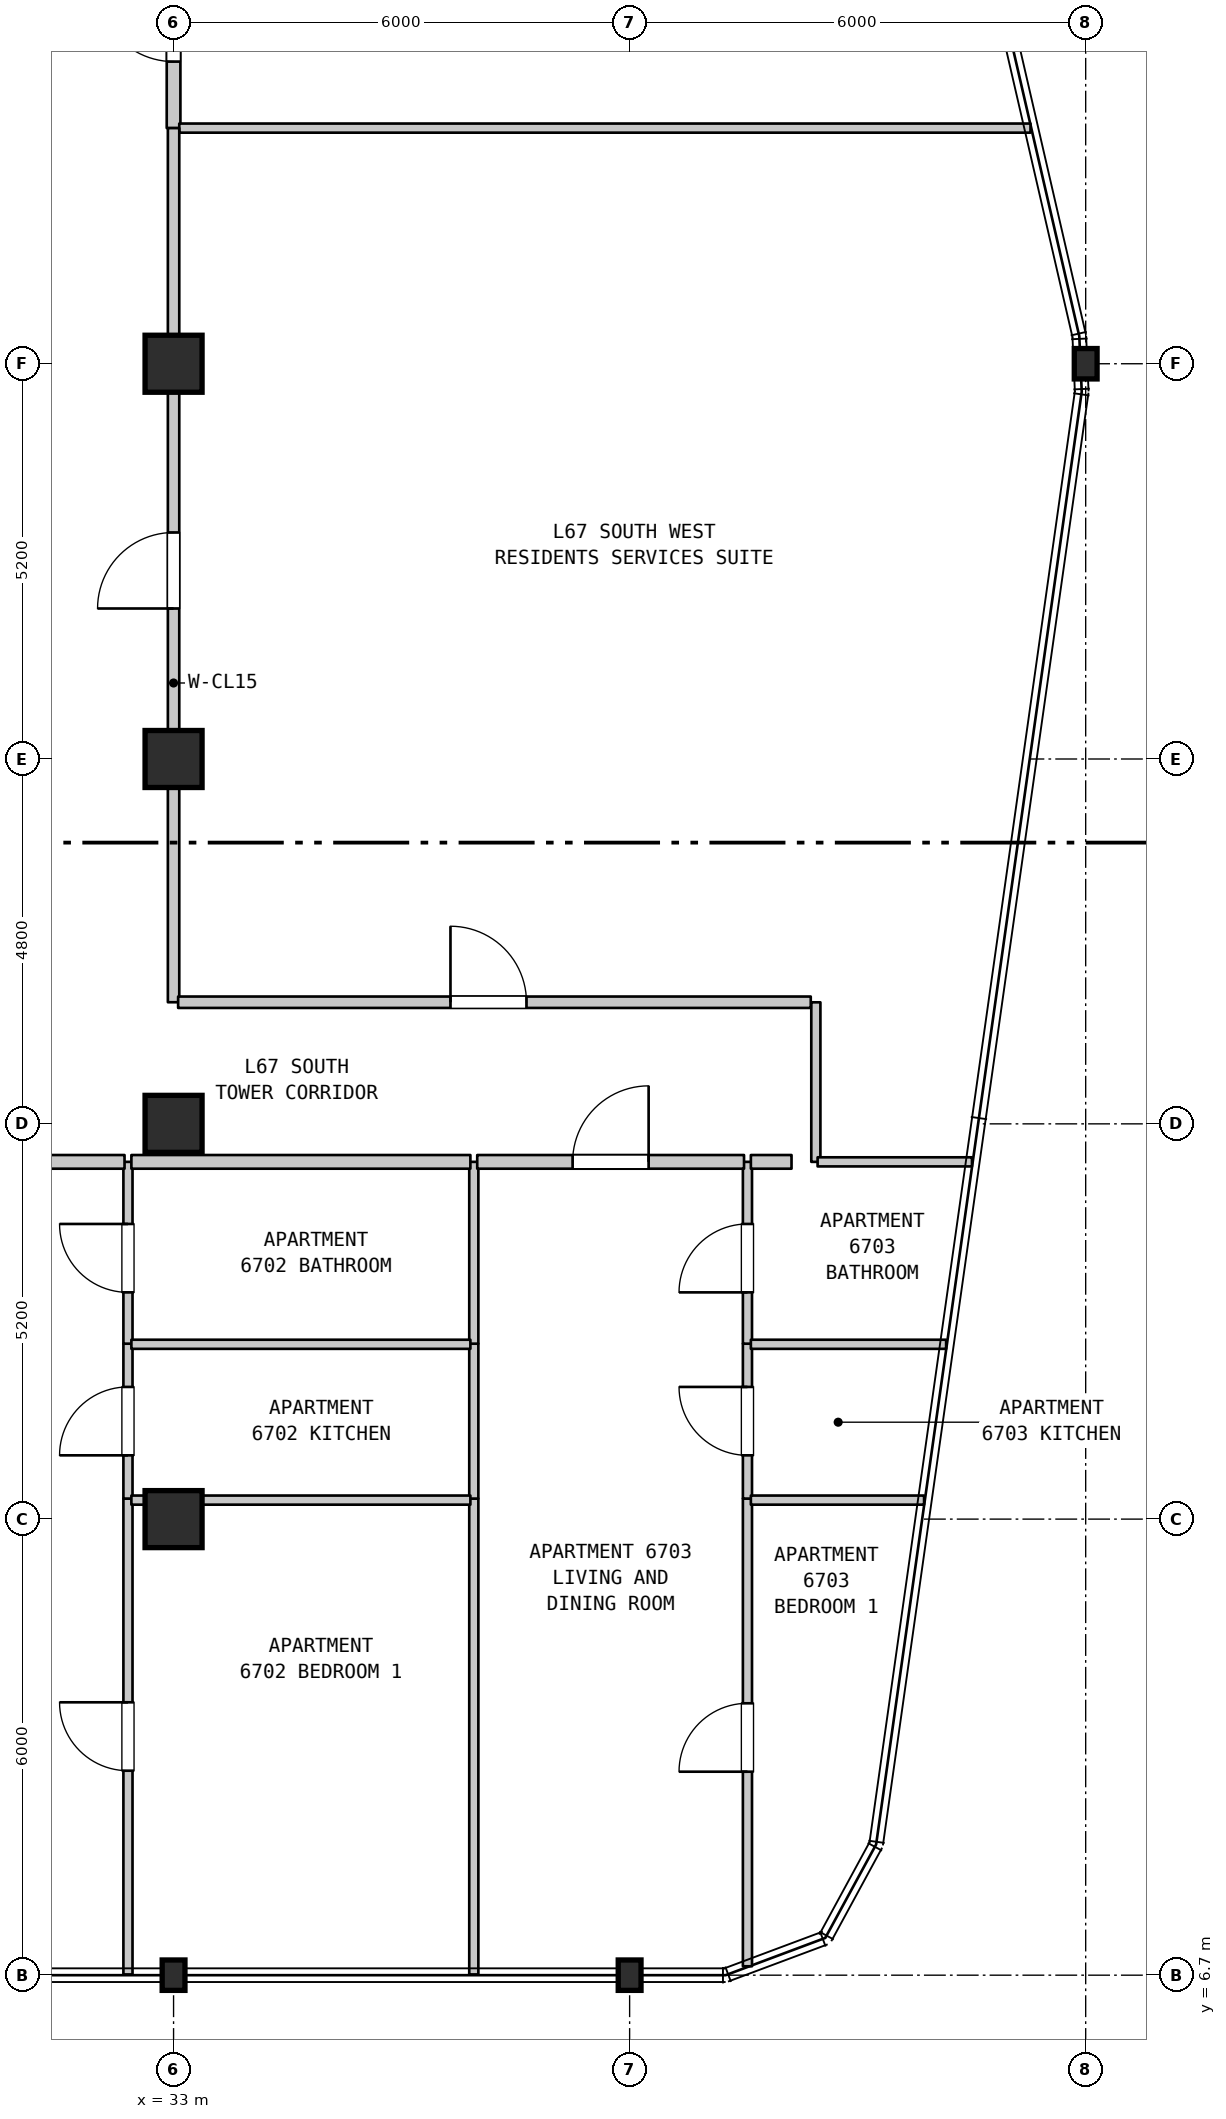
"""IFC4 building model, lengths in metres.
Left out: names, types, materials, properties, quantities, classifications, styles, units other than length and angle.
Written with IfcOpenShell. Run it as: python <this file> out.ifc"""

import sys

from ifc_helpers import new_model, si_unit, direction, frame, frame_2d, origin, origin_2d, place, context, subcontext, project, spatial, rectangle, i_section, extrude, element, fill, save


model = new_model("IFC4")
c1 = context("Model", 3, precision=1e-05, world=origin(), true_north=direction((0.0, 1.0)))
c2 = subcontext(c1, "Body", "Model", "MODEL_VIEW")
j1 = project(units=[si_unit("LENGTHUNIT", "METRE"), si_unit("PLANEANGLEUNIT", "RADIAN")], contexts=[c1])
p1 = place(None, origin())
s1 = spatial("IfcSite", under=j1, at=p1, CompositionType="ELEMENT")
p2 = place(p1, origin())
s2 = spatial("IfcBuilding", under=s1, at=p2, CompositionType="ELEMENT")
p3 = place(p2, frame((0.0, 0.0, 269.5)))
s3 = spatial("IfcBuildingStorey", under=s2, at=p3, CompositionType="ELEMENT", Elevation=269.5)
p4 = place(p3, frame((33.0, 6.7, 0.0), z_axis=(0.0, 0.0, 1.0), x_axis=(1.0, 0.0, 0.0)))
e1 = element("IfcColumn", 1, at=p4, inside=s3, PredefinedType="COLUMN", context=c2, shape_type="SweptSolid", body=[
    extrude(i_section(OverallWidth=0.3, OverallDepth=0.4, WebThickness=0.013, FlangeThickness=0.024, FilletRadius=0.027, at=origin_2d()), origin(), (0.0, 0.0, 1.0), 3.7),
])
for number, where, z_axis, x_axis in (
    (2, (33.0, 12.7, 0.0), (0.0, 0.0, 1.0), (1.0, 0.0, 0.0)),
    (3, (33.0, 17.9, 0.0), (0.0, 0.0, 1.0), (1.0, 0.0, 0.0)),
    (4, (33.0, 22.7, 0.0), (0.0, 0.0, 1.0), (1.0, 0.0, 0.0)),
    (5, (33.0, 27.9, 0.0), (0.0, 0.0, 1.0), (1.0, 0.0, 0.0)),
):
    element("IfcColumn", number, at=place(p3, frame(where, z_axis=z_axis, x_axis=x_axis)), inside=s3, PredefinedType="COLUMN", context=c2, shape_type="SweptSolid", body=[
        extrude(rectangle(XDim=0.75, YDim=0.75, at=origin_2d()), origin(), (0.0, 0.0, 1.0), 3.7),
    ])
for number, where, z_axis, x_axis in (
    (6, (39.0, 6.7, 0.0), (0.0, 0.0, 1.0), (1.0, 0.0, 0.0)),
    (7, (45.0, 27.9, 0.0), (0.0, 0.0, 1.0), (1.0, 0.0, 0.0)),
):
    element("IfcColumn", number, at=place(p3, frame(where, z_axis=z_axis, x_axis=x_axis)), inside=s3, PredefinedType="COLUMN", context=c2, shape_type="SweptSolid", body=[
        extrude(i_section(OverallWidth=0.3, OverallDepth=0.4, WebThickness=0.013, FlangeThickness=0.024, FilletRadius=0.027, at=origin_2d()), origin(), (0.0, 0.0, 1.0), 3.7),
    ])
p5 = place(p3, frame((32.4, 6.71, 0.0), z_axis=(0.0, 0.0, 1.0), x_axis=(0.0, 1.0, 0.0)))
e8 = element("IfcWall", 8, at=p5, inside=s3, PredefinedType="PARTITIONING", context=c2, shape_type="SweptSolid", body=[
    extrude(rectangle(XDim=6.26, YDim=0.12, at=frame_2d((3.13, 0.0))), origin(), (0.0, 0.0, 1.0), 3.39),
])
p6 = place(p5, frame((2.68, 0.0, 0.0)))
e9 = element("IfcOpeningElement", 9, at=p6, cuts=e8, PredefinedType="OPENING", context=c2, shape_type="SweptSolid", body=[
    extrude(rectangle(XDim=0.9, YDim=2.15, at=frame_2d((0.45, 1.075))), frame((0.0, 0.07, 0.0), z_axis=(0.0, -1.0, 0.0), x_axis=(1.0, 0.0, 0.0)), (0.0, 0.0, 1.0), 0.14),
])
p7 = place(p3, frame((32.4, 12.97, 0.0), z_axis=(0.0, 0.0, 1.0), x_axis=(0.0, 1.0, 0.0)))
e10 = element("IfcWall", 10, at=p7, inside=s3, PredefinedType="PARTITIONING", context=c2, shape_type="SweptSolid", body=[
    extrude(rectangle(XDim=2.038, YDim=0.12, at=frame_2d((1.019, 0.0))), origin(), (0.0, 0.0, 1.0), 3.39),
])
p8 = place(p7, frame((0.569, 0.0, 0.0)))
e11 = element("IfcOpeningElement", 11, at=p8, cuts=e10, PredefinedType="OPENING", context=c2, shape_type="SweptSolid", body=[
    extrude(rectangle(XDim=0.9, YDim=2.15, at=frame_2d((0.45, 1.075))), frame((0.0, 0.07, 0.0), z_axis=(0.0, -1.0, 0.0), x_axis=(1.0, 0.0, 0.0)), (0.0, 0.0, 1.0), 0.14),
])
p9 = place(p3, frame((32.4, 15.008, 0.0), z_axis=(0.0, 0.0, 1.0), x_axis=(0.0, 1.0, 0.0)))
e12 = element("IfcWall", 12, at=p9, inside=s3, PredefinedType="PARTITIONING", context=c2, shape_type="SweptSolid", body=[
    extrude(rectangle(XDim=2.392, YDim=0.12, at=frame_2d((1.196, 0.0))), origin(), (0.0, 0.0, 1.0), 3.39),
])
p10 = place(p9, frame((0.675, 0.0, 0.0)))
e13 = element("IfcOpeningElement", 13, at=p10, cuts=e12, PredefinedType="OPENING", context=c2, shape_type="SweptSolid", body=[
    extrude(rectangle(XDim=0.9, YDim=2.1, at=frame_2d((0.45, 1.05))), frame((0.0, 0.07, 0.0), z_axis=(0.0, -1.0, 0.0), x_axis=(1.0, 0.0, 0.0)), (0.0, 0.0, 1.0), 0.14),
])
p11 = place(p3, frame((33.0, 19.5, 0.0), z_axis=(0.0, 0.0, 1.0), x_axis=(0.0, 1.0, 0.0)))
e14 = element("IfcWall", 14, at=p11, inside=s3, PredefinedType="STANDARD", context=c2, shape_type="SweptSolid", body=[
    extrude(rectangle(XDim=8.4, YDim=0.15, at=frame_2d((4.2, 0.0))), origin(), (0.0, 0.0, 1.0), 3.1),
])
p12 = place(p11, frame((5.18, 0.0, 0.0)))
e15 = element("IfcOpeningElement", 15, at=p12, cuts=e14, PredefinedType="OPENING", context=c2, shape_type="SweptSolid", body=[
    extrude(rectangle(XDim=1.0, YDim=2.15, at=frame_2d((0.5, 1.075))), frame((0.0, 0.085, 0.0), z_axis=(0.0, -1.0, 0.0), x_axis=(1.0, 0.0, 0.0)), (0.0, 0.0, 1.0), 0.17),
])
p13 = place(p3, frame((33.0, 31.0, 0.0), z_axis=(0.0, 0.0, 1.0), x_axis=(0.0, 1.0, 0.0)))
e16 = element("IfcWall", 16, at=p13, inside=s3, PredefinedType="STANDARD", context=c2, shape_type="SweptSolid", body=[
    extrude(rectangle(XDim=2.75, YDim=0.18, at=frame_2d((1.375, 0.0))), origin(), (0.0, 0.0, 1.0), 2.89),
])
p14 = place(p13, frame((0.875, 0.0, 0.0)))
e17 = element("IfcOpeningElement", 17, at=p14, cuts=e16, PredefinedType="OPENING", context=c2, shape_type="SweptSolid", body=[
    extrude(rectangle(XDim=1.0, YDim=2.15, at=frame_2d((0.5, 1.075))), frame((0.0, 0.1, 0.0), z_axis=(0.0, -1.0, 0.0), x_axis=(1.0, 0.0, 0.0)), (0.0, 0.0, 1.0), 0.2),
])
p15 = place(p3, frame((36.95, 6.71, 0.0), z_axis=(0.0, 0.0, 1.0), x_axis=(0.0, 1.0, 0.0)))
e18 = element("IfcWall", 18, at=p15, inside=s3, PredefinedType="PARTITIONING", context=c2, shape_type="SweptSolid", body=[
    extrude(rectangle(XDim=6.26, YDim=0.12, at=frame_2d((3.13, 0.0))), origin(), (0.0, 0.0, 1.0), 3.39),
])
p16 = place(p3, frame((36.95, 12.97, 0.0), z_axis=(0.0, 0.0, 1.0), x_axis=(0.0, 1.0, 0.0)))
e19 = element("IfcWall", 19, at=p16, inside=s3, PredefinedType="PARTITIONING", context=c2, shape_type="SweptSolid", body=[
    extrude(rectangle(XDim=2.038, YDim=0.12, at=frame_2d((1.019, 0.0))), origin(), (0.0, 0.0, 1.0), 3.39),
])
p17 = place(p3, frame((36.95, 15.008, 0.0), z_axis=(0.0, 0.0, 1.0), x_axis=(0.0, 1.0, 0.0)))
e20 = element("IfcWall", 20, at=p17, inside=s3, PredefinedType="PARTITIONING", context=c2, shape_type="SweptSolid", body=[
    extrude(rectangle(XDim=2.392, YDim=0.12, at=frame_2d((1.196, 0.0))), origin(), (0.0, 0.0, 1.0), 3.39),
])
p18 = place(p3, frame((40.55, 6.817, 0.0), z_axis=(0.0, 0.0, 1.0), x_axis=(0.0, 1.0, 0.0)))
e21 = element("IfcWall", 21, at=p18, inside=s3, PredefinedType="PARTITIONING", context=c2, shape_type="SweptSolid", body=[
    extrude(rectangle(XDim=6.153, YDim=0.12, at=frame_2d((3.077, 0.0))), origin(), (0.0, 0.0, 1.0), 3.39),
])
p19 = place(p18, frame((2.56, 0.0, 0.0)))
e22 = element("IfcOpeningElement", 22, at=p19, cuts=e21, PredefinedType="OPENING", context=c2, shape_type="SweptSolid", body=[
    extrude(rectangle(XDim=0.9, YDim=2.15, at=frame_2d((0.45, 1.075))), frame((0.0, 0.07, 0.0), z_axis=(0.0, -1.0, 0.0), x_axis=(1.0, 0.0, 0.0)), (0.0, 0.0, 1.0), 0.14),
])
p20 = place(p3, frame((40.55, 12.97, 0.0), z_axis=(0.0, 0.0, 1.0), x_axis=(0.0, 1.0, 0.0)))
e23 = element("IfcWall", 23, at=p20, inside=s3, PredefinedType="PARTITIONING", context=c2, shape_type="SweptSolid", body=[
    extrude(rectangle(XDim=2.038, YDim=0.12, at=frame_2d((1.019, 0.0))), origin(), (0.0, 0.0, 1.0), 3.39),
])
p21 = place(p20, frame((0.569, 0.0, 0.0)))
e24 = element("IfcOpeningElement", 24, at=p21, cuts=e23, PredefinedType="OPENING", context=c2, shape_type="SweptSolid", body=[
    extrude(rectangle(XDim=0.9, YDim=2.15, at=frame_2d((0.45, 1.075))), frame((0.0, 0.07, 0.0), z_axis=(0.0, -1.0, 0.0), x_axis=(1.0, 0.0, 0.0)), (0.0, 0.0, 1.0), 0.14),
])
p22 = place(p3, frame((40.55, 15.008, 0.0), z_axis=(0.0, 0.0, 1.0), x_axis=(0.0, 1.0, 0.0)))
e25 = element("IfcWall", 25, at=p22, inside=s3, PredefinedType="PARTITIONING", context=c2, shape_type="SweptSolid", body=[
    extrude(rectangle(XDim=2.392, YDim=0.12, at=frame_2d((1.196, 0.0))), origin(), (0.0, 0.0, 1.0), 3.39),
])
p23 = place(p22, frame((0.675, 0.0, 0.0)))
e26 = element("IfcOpeningElement", 26, at=p23, cuts=e25, PredefinedType="OPENING", context=c2, shape_type="SweptSolid", body=[
    extrude(rectangle(XDim=0.9, YDim=2.1, at=frame_2d((0.45, 1.05))), frame((0.0, 0.07, 0.0), z_axis=(0.0, -1.0, 0.0), x_axis=(1.0, 0.0, 0.0)), (0.0, 0.0, 1.0), 0.14),
])
p24 = place(p3, frame((41.45, 17.4, 0.0), z_axis=(0.0, 0.0, 1.0), x_axis=(0.0, 1.0, 0.0)))
e27 = element("IfcWall", 27, at=p24, inside=s3, PredefinedType="PARTITIONING", context=c2, shape_type="SweptSolid", body=[
    extrude(rectangle(XDim=2.099, YDim=0.12, at=frame_2d((1.05, 0.0))), origin(), (0.0, 0.0, 1.0), 3.39),
])
p25 = place(p3, frame((32.445, 12.95, 0.0), z_axis=(0.0, 0.0, 1.0), x_axis=(1.0, 0.0, 0.0)))
e28 = element("IfcWall", 28, at=p25, inside=s3, PredefinedType="PARTITIONING", context=c2, shape_type="SweptSolid", body=[
    extrude(rectangle(XDim=4.46, YDim=0.12, at=frame_2d((2.23, 0.0))), origin(), (0.0, 0.0, 1.0), 3.39),
])
p26 = place(p3, frame((40.595, 12.95, 0.0), z_axis=(0.0, 0.0, 1.0), x_axis=(1.0, 0.0, 0.0)))
e29 = element("IfcWall", 29, at=p26, inside=s3, PredefinedType="PARTITIONING", context=c2, shape_type="SweptSolid", body=[
    extrude(rectangle(XDim=2.279, YDim=0.12, at=frame_2d((1.14, 0.0))), origin(), (0.0, 0.0, 1.0), 3.39),
])
p27 = place(p3, frame((32.445, 15.0, 0.0), z_axis=(0.0, 0.0, 1.0), x_axis=(1.0, 0.0, 0.0)))
e30 = element("IfcWall", 30, at=p27, inside=s3, PredefinedType="PARTITIONING", context=c2, shape_type="SweptSolid", body=[
    extrude(rectangle(XDim=4.46, YDim=0.12, at=frame_2d((2.23, 0.0))), origin(), (0.0, 0.0, 1.0), 3.39),
])
p28 = place(p3, frame((40.595, 15.0, 0.0), z_axis=(0.0, 0.0, 1.0), x_axis=(1.0, 0.0, 0.0)))
e31 = element("IfcWall", 31, at=p28, inside=s3, PredefinedType="PARTITIONING", context=c2, shape_type="SweptSolid", body=[
    extrude(rectangle(XDim=2.569, YDim=0.12, at=frame_2d((1.285, 0.0))), origin(), (0.0, 0.0, 1.0), 3.39),
])
p29 = place(p3, frame((28.845, 17.4, 0.0), z_axis=(0.0, 0.0, 1.0), x_axis=(1.0, 0.0, 0.0)))
e32 = element("IfcWall", 32, at=p29, inside=s3, PredefinedType="STANDARD", context=c2, shape_type="SweptSolid", body=[
    extrude(rectangle(XDim=3.51, YDim=0.18, at=frame_2d((1.755, 0.0))), origin(), (0.0, 0.0, 1.0), 3.39),
])
p30 = place(p29, frame((1.255, 0.0, 0.0)))
e33 = element("IfcOpeningElement", 33, at=p30, cuts=e32, PredefinedType="OPENING", context=c2, shape_type="SweptSolid", body=[
    extrude(rectangle(XDim=1.0, YDim=2.15, at=frame_2d((0.5, 1.075))), frame((0.0, 0.1, 0.0), z_axis=(0.0, -1.0, 0.0), x_axis=(1.0, 0.0, 0.0)), (0.0, 0.0, 1.0), 0.2),
])
p31 = place(p3, frame((32.445, 17.4, 0.0), z_axis=(0.0, 0.0, 1.0), x_axis=(1.0, 0.0, 0.0)))
e34 = element("IfcWall", 34, at=p31, inside=s3, PredefinedType="STANDARD", context=c2, shape_type="SweptSolid", body=[
    extrude(rectangle(XDim=4.46, YDim=0.18, at=frame_2d((2.23, 0.0))), origin(), (0.0, 0.0, 1.0), 3.39),
])
p32 = place(p3, frame((36.995, 17.4, 0.0), z_axis=(0.0, 0.0, 1.0), x_axis=(1.0, 0.0, 0.0)))
e35 = element("IfcWall", 35, at=p32, inside=s3, PredefinedType="STANDARD", context=c2, shape_type="SweptSolid", body=[
    extrude(rectangle(XDim=3.51, YDim=0.18, at=frame_2d((1.755, 0.0))), origin(), (0.0, 0.0, 1.0), 3.39),
])
p33 = place(p32, frame((1.255, 0.0, 0.0)))
e36 = element("IfcOpeningElement", 36, at=p33, cuts=e35, PredefinedType="OPENING", context=c2, shape_type="SweptSolid", body=[
    extrude(rectangle(XDim=1.0, YDim=2.15, at=frame_2d((0.5, 1.075))), frame((0.0, 0.1, 0.0), z_axis=(0.0, -1.0, 0.0), x_axis=(1.0, 0.0, 0.0)), (0.0, 0.0, 1.0), 0.2),
])
p34 = place(p3, frame((40.595, 17.4, 0.0), z_axis=(0.0, 0.0, 1.0), x_axis=(1.0, 0.0, 0.0)))
e37 = element("IfcWall", 37, at=p34, inside=s3, PredefinedType="STANDARD", context=c2, shape_type="SweptSolid", body=[
    extrude(rectangle(XDim=0.535, YDim=0.18, at=frame_2d((0.268, 0.0))), origin(), (0.0, 0.0, 1.0), 3.39),
])
p35 = place(p3, frame((41.473, 17.4, 0.0), z_axis=(0.0, 0.0, 1.0), x_axis=(1.0, 0.0, 0.0)))
e38 = element("IfcWall", 38, at=p35, inside=s3, PredefinedType="PARTITIONING", context=c2, shape_type="SweptSolid", body=[
    extrude(rectangle(XDim=2.031, YDim=0.12, at=frame_2d((1.016, 0.0))), origin(), (0.0, 0.0, 1.0), 3.39),
])
p36 = place(p3, frame((33.06, 19.5, 0.0), z_axis=(0.0, 0.0, 1.0), x_axis=(1.0, 0.0, 0.0)))
e39 = element("IfcWall", 39, at=p36, inside=s3, PredefinedType="STANDARD", context=c2, shape_type="SweptSolid", body=[
    extrude(rectangle(XDim=8.323, YDim=0.15, at=frame_2d((4.162, 0.0))), origin(), (0.0, 0.0, 1.0), 3.39),
])
p37 = place(p36, frame((3.583, 0.0, 0.0)))
e40 = element("IfcOpeningElement", 40, at=p37, cuts=e39, PredefinedType="OPENING", context=c2, shape_type="SweptSolid", body=[
    extrude(rectangle(XDim=1.0, YDim=2.15, at=frame_2d((0.5, 1.075))), frame((0.0, 0.085, 0.0), z_axis=(0.0, -1.0, 0.0), x_axis=(1.0, 0.0, 0.0)), (0.0, 0.0, 1.0), 0.17),
])
p38 = place(p3, frame((33.075, 31.0, 0.0), z_axis=(0.0, 0.0, 1.0), x_axis=(1.0, 0.0, 0.0)))
e41 = element("IfcWall", 41, at=p38, inside=s3, PredefinedType="PARTITIONING", context=c2, shape_type="SweptSolid", body=[
    extrude(rectangle(XDim=11.199, YDim=0.12, at=frame_2d((5.6, 0.0))), origin(), (0.0, 0.0, 1.0), 3.39),
])
p39 = place(p3, frame((33.0, 27.9, 0.0), z_axis=(0.0, 0.0, 1.0), x_axis=(0.0, 1.0, 0.0)))
e42 = element("IfcWall", 42, at=p39, inside=s3, PredefinedType="STANDARD", context=c2, shape_type="SweptSolid", body=[
    extrude(rectangle(XDim=3.1, YDim=0.15, at=frame_2d((1.55, 0.0))), origin(), (0.0, 0.0, 1.0), 2.89),
])
p40 = place(p6, origin())
e43 = element("IfcDoor", 43, at=p40, inside=s3, OperationType="SINGLE_SWING_RIGHT", PredefinedType="DOOR", context=c2, shape_type="SweptSolid", body=[
    extrude(rectangle(XDim=0.9, YDim=2.15, at=frame_2d((0.45, 1.075))), frame((0.0, 0.025, 0.0), z_axis=(0.0, -1.0, 0.0), x_axis=(1.0, 0.0, 0.0)), (0.0, 0.0, 1.0), 0.05),
])
fill(e9, e43)
p41 = place(p8, origin())
e44 = element("IfcDoor", 44, at=p41, inside=s3, OperationType="SINGLE_SWING_LEFT", PredefinedType="DOOR", context=c2, shape_type="SweptSolid", body=[
    extrude(rectangle(XDim=0.9, YDim=2.15, at=frame_2d((0.45, 1.075))), frame((0.0, 0.025, 0.0), z_axis=(0.0, -1.0, 0.0), x_axis=(1.0, 0.0, 0.0)), (0.0, 0.0, 1.0), 0.05),
])
fill(e11, e44)
p42 = place(p10, origin())
e45 = element("IfcDoor", 45, at=p42, inside=s3, OperationType="SINGLE_SWING_RIGHT", PredefinedType="DOOR", context=c2, shape_type="SweptSolid", body=[
    extrude(rectangle(XDim=0.9, YDim=2.1, at=frame_2d((0.45, 1.05))), frame((0.0, 0.025, 0.0), z_axis=(0.0, -1.0, 0.0), x_axis=(1.0, 0.0, 0.0)), (0.0, 0.0, 1.0), 0.05),
])
fill(e13, e45)
p43 = place(p12, origin())
e46 = element("IfcDoor", 46, at=p43, inside=s3, OperationType="SINGLE_SWING_LEFT", PredefinedType="DOOR", context=c2, shape_type="SweptSolid", body=[
    extrude(rectangle(XDim=1.0, YDim=2.15, at=frame_2d((0.5, 1.075))), frame((0.0, 0.025, 0.0), z_axis=(0.0, -1.0, 0.0), x_axis=(1.0, 0.0, 0.0)), (0.0, 0.0, 1.0), 0.05),
])
fill(e15, e46)
p44 = place(p14, origin())
e47 = element("IfcDoor", 47, at=p44, inside=s3, OperationType="SINGLE_SWING_RIGHT", PredefinedType="DOOR", context=c2, shape_type="SweptSolid", body=[
    extrude(rectangle(XDim=1.0, YDim=2.15, at=frame_2d((0.5, 1.075))), frame((0.0, 0.025, 0.0), z_axis=(0.0, -1.0, 0.0), x_axis=(1.0, 0.0, 0.0)), (0.0, 0.0, 1.0), 0.05),
])
fill(e17, e47)
p45 = place(p19, origin())
e48 = element("IfcDoor", 48, at=p45, inside=s3, OperationType="SINGLE_SWING_LEFT", PredefinedType="DOOR", context=c2, shape_type="SweptSolid", body=[
    extrude(rectangle(XDim=0.9, YDim=2.15, at=frame_2d((0.45, 1.075))), frame((0.0, 0.025, 0.0), z_axis=(0.0, -1.0, 0.0), x_axis=(1.0, 0.0, 0.0)), (0.0, 0.0, 1.0), 0.05),
])
fill(e22, e48)
p46 = place(p21, origin())
e49 = element("IfcDoor", 49, at=p46, inside=s3, OperationType="SINGLE_SWING_RIGHT", PredefinedType="DOOR", context=c2, shape_type="SweptSolid", body=[
    extrude(rectangle(XDim=0.9, YDim=2.15, at=frame_2d((0.45, 1.075))), frame((0.0, 0.025, 0.0), z_axis=(0.0, -1.0, 0.0), x_axis=(1.0, 0.0, 0.0)), (0.0, 0.0, 1.0), 0.05),
])
fill(e24, e49)
p47 = place(p23, origin())
e50 = element("IfcDoor", 50, at=p47, inside=s3, OperationType="SINGLE_SWING_LEFT", PredefinedType="DOOR", context=c2, shape_type="SweptSolid", body=[
    extrude(rectangle(XDim=0.9, YDim=2.1, at=frame_2d((0.45, 1.05))), frame((0.0, 0.025, 0.0), z_axis=(0.0, -1.0, 0.0), x_axis=(1.0, 0.0, 0.0)), (0.0, 0.0, 1.0), 0.05),
])
fill(e26, e50)
p48 = place(p33, origin())
e51 = element("IfcDoor", 51, at=p48, inside=s3, OperationType="SINGLE_SWING_RIGHT", PredefinedType="DOOR", context=c2, shape_type="SweptSolid", body=[
    extrude(rectangle(XDim=1.0, YDim=2.15, at=frame_2d((0.5, 1.075))), frame((0.0, 0.025, 0.0), z_axis=(0.0, -1.0, 0.0), x_axis=(1.0, 0.0, 0.0)), (0.0, 0.0, 1.0), 0.05),
])
fill(e36, e51)
p49 = place(p37, origin())
e52 = element("IfcDoor", 52, at=p49, inside=s3, OperationType="SINGLE_SWING_LEFT", PredefinedType="DOOR", context=c2, shape_type="SweptSolid", body=[
    extrude(rectangle(XDim=1.0, YDim=2.15, at=frame_2d((0.5, 1.075))), frame((0.0, 0.025, 0.0), z_axis=(0.0, -1.0, 0.0), x_axis=(1.0, 0.0, 0.0)), (0.0, 0.0, 1.0), 0.05),
])
fill(e40, e52)
save(model, sys.argv[1])
